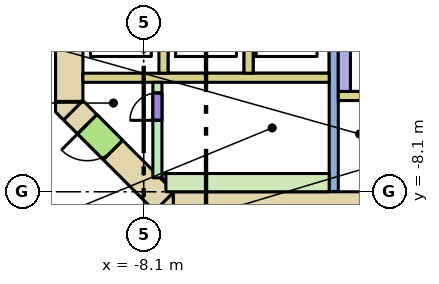
"""IFC4 building model, lengths in metres.
Left out: names, types, materials, properties, quantities, classifications, styles, units other than length and angle.
Written with IfcOpenShell. Run it as: python <this file> out.ifc"""

import sys

from ifc_helpers import new_model, si_unit, direction, frame, frame_2d, origin, place, context, subcontext, project, spatial, polyline, rectangle, outline, extrude, element, fill, save


model = new_model("IFC4")
c1 = context("Model", 3, precision=1e-05, world=origin(), true_north=direction((0.0, 1.0)))
c2 = subcontext(c1, "Body", "Model", "MODEL_VIEW")
j1 = project(units=[si_unit("LENGTHUNIT", "METRE"), si_unit("PLANEANGLEUNIT", "RADIAN")], contexts=[c1])
p1 = place(None, origin())
s1 = spatial("IfcSite", under=j1, at=p1, CompositionType="ELEMENT")
p2 = place(p1, origin())
s2 = spatial("IfcBuilding", under=s1, at=p2, CompositionType="ELEMENT")
p3 = place(p2, frame((0.0, 0.0, -3.6)))
s3 = spatial("IfcBuildingStorey", under=s2, at=p3, CompositionType="ELEMENT", Elevation=-3.6)
p4 = place(p3, frame((-7.13, -8.55, -0.32), z_axis=(0.0, 0.0, 1.0), x_axis=(1.0, 0.0, 0.0)))
e1 = element("IfcWall", 1, at=p4, inside=s3, PredefinedType="SHEAR", context=c2, shape_type="SweptSolid", body=[
    extrude(rectangle(XDim=14.26, YDim=0.9, at=frame_2d((7.13, 0.0))), origin(), (0.0, 0.0, 1.0), 3.6),
])
p5 = place(p4, frame((8.08, 0.0, 0.32)))
e2 = element("IfcOpeningElement", 2, at=p5, cuts=e1, PredefinedType="OPENING", context=c2, shape_type="SweptSolid", body=[
    extrude(rectangle(XDim=0.7, YDim=2.1, at=frame_2d((0.35, 1.05))), frame((0.0, 0.46, 0.0), z_axis=(0.0, -1.0, 0.0), x_axis=(1.0, 0.0, 0.0)), (0.0, 0.0, 1.0), 0.92),
])
p6 = place(p4, frame((6.205, 0.0, 0.32)))
e3 = element("IfcOpeningElement", 3, at=p6, cuts=e1, PredefinedType="OPENING", context=c2, shape_type="SweptSolid", body=[
    extrude(rectangle(XDim=0.9, YDim=2.1, at=frame_2d((0.45, 1.05))), frame((0.0, 0.46, 0.0), z_axis=(0.0, -1.0, 0.0), x_axis=(1.0, 0.0, 0.0)), (0.0, 0.0, 1.0), 0.92),
])
p7 = place(p4, frame((10.667, 0.0, 0.32)))
e4 = element("IfcOpeningElement", 4, at=p7, cuts=e1, PredefinedType="OPENING", context=c2, shape_type="SweptSolid", body=[
    extrude(rectangle(XDim=0.9, YDim=2.1, at=frame_2d((0.45, 1.05))), frame((0.0, 0.46, 0.0), z_axis=(0.0, -1.0, 0.0), x_axis=(1.0, 0.0, 0.0)), (0.0, 0.0, 1.0), 0.92),
])
p8 = place(p3, frame((-10.55, -5.13, -0.32), z_axis=(0.0, 0.0, 1.0), x_axis=(0.0, 1.0, 0.0)))
e5 = element("IfcWall", 5, at=p8, inside=s3, PredefinedType="SHEAR", context=c2, shape_type="SweptSolid", body=[
    extrude(rectangle(XDim=10.26, YDim=0.9, at=frame_2d((5.13, 0.0))), origin(), (0.0, 0.0, 1.0), 3.6),
])
p9 = place(p8, frame((4.13, 0.0, 0.32)))
e6 = element("IfcOpeningElement", 6, at=p9, cuts=e5, PredefinedType="OPENING", context=c2, shape_type="SweptSolid", body=[
    extrude(rectangle(XDim=2.0, YDim=2.1, at=frame_2d((1.0, 1.05))), frame((0.0, 0.46, 0.0), z_axis=(0.0, -1.0, 0.0), x_axis=(1.0, 0.0, 0.0)), (0.0, 0.0, 1.0), 0.92),
])
p10 = place(p3, frame((-7.418, -8.418, -0.32), z_axis=(0.0, 0.0, 1.0), x_axis=(-0.707106781187, 0.707106781187, 0.0)))
e7 = element("IfcWall", 7, at=p10, inside=s3, PredefinedType="SHEAR", context=c2, shape_type="SweptSolid", body=[
    extrude(rectangle(XDim=4.243, YDim=0.9, at=frame_2d((2.121, 0.0))), origin(), (0.0, 0.0, 1.0), 3.6),
])
p11 = place(p10, frame((2.393, 0.0, 0.32)))
e8 = element("IfcOpeningElement", 8, at=p11, cuts=e7, PredefinedType="OPENING", context=c2, shape_type="SweptSolid", body=[
    extrude(rectangle(XDim=1.2, YDim=2.1, at=frame_2d((0.6, 1.05))), frame((0.0, 0.46, 0.0), z_axis=(0.0, -1.0, 0.0), x_axis=(1.0, 0.0, 0.0)), (0.0, 0.0, 1.0), 0.92),
])
p12 = place(p3, frame((0.0, 0.0, -0.32)))
e9 = element("IfcWall", 9, at=p12, inside=s3, PredefinedType="SHEAR", context=c2, shape_type="SweptSolid", body=[
    extrude(outline(polyline([(-7.473, -9.0), (-7.736, -8.736), (-7.13, -8.13), (-7.13, -9.0), (-7.473, -9.0)])), origin(), (0.0, 0.0, 1.0), 3.6),
])
p13 = place(p3, frame((0.0, 0.0, -0.32)))
e10 = element("IfcWall", 10, at=p13, inside=s3, PredefinedType="SHEAR", context=c2, shape_type="SweptSolid", body=[
    extrude(outline(polyline([(-11.0, -5.473), (-11.0, -5.13), (-10.13, -5.13), (-10.736, -5.736), (-11.0, -5.473)])), origin(), (0.0, 0.0, 1.0), 3.6),
])
p14 = place(p3, frame((-10.1, -4.35, 0.0), z_axis=(0.0, 0.0, 1.0), x_axis=(1.0, 0.0, 0.0)))
e11 = element("IfcWall", 11, at=p14, inside=s3, PredefinedType="SOLIDWALL", context=c2, shape_type="SweptSolid", body=[
    extrude(rectangle(XDim=8.1, YDim=0.3, at=frame_2d((4.05, 0.0))), origin(), (0.0, 0.0, 1.0), 3.28),
])
for number, where, z_axis, x_axis in (
    (12, (-7.45, -4.2, 0.0), (0.0, 0.0, 1.0), (0.0, 1.0, 0.0)),
    (13, (-4.65, -4.2, 0.0), (0.0, 0.0, 1.0), (0.0, 1.0, 0.0)),
):
    element("IfcWall", number, at=place(p3, frame(where, z_axis=z_axis, x_axis=x_axis)), inside=s3, PredefinedType="SOLIDWALL", context=c2, shape_type="SweptSolid", body=[
        extrude(rectangle(XDim=2.4, YDim=0.3, at=frame_2d((1.2, 0.0))), origin(), (0.0, 0.0, 1.0), 3.28),
    ])
p15 = place(p3, frame((-1.85, -8.1, 0.0), z_axis=(0.0, 0.0, 1.0), x_axis=(0.0, 1.0, 0.0)))
e14 = element("IfcWall", 14, at=p15, inside=s3, PredefinedType="SHEAR", context=c2, shape_type="SweptSolid", body=[
    extrude(rectangle(XDim=6.6, YDim=0.3, at=frame_2d((3.3, 0.0))), origin(), (0.0, 0.0, 1.0), 3.28),
])
p16 = place(p3, frame((-1.5, -4.8, 0.0), z_axis=(0.0, 0.0, 1.0), x_axis=(0.0, 1.0, 0.0)))
e15 = element("IfcWall", 15, at=p16, inside=s3, PredefinedType="SOLIDWALL", context=c2, shape_type="SweptSolid", body=[
    extrude(rectangle(XDim=3.0, YDim=0.4, at=frame_2d((1.5, 0.0))), origin(), (0.0, 0.0, 1.0), 3.28),
])
p17 = place(p3, frame((-1.7, -4.95, 0.0), z_axis=(0.0, 0.0, 1.0), x_axis=(1.0, 0.0, 0.0)))
e16 = element("IfcWall", 16, at=p17, inside=s3, PredefinedType="SOLIDWALL", context=c2, shape_type="SweptSolid", body=[
    extrude(rectangle(XDim=3.4, YDim=0.3, at=frame_2d((1.7, 0.0))), origin(), (0.0, 0.0, 1.0), 3.28),
])
p18 = place(p3, frame((-7.65, -7.64, 0.0), z_axis=(0.0, 0.0, 1.0), x_axis=(0.0, 1.0, 0.0)))
e17 = element("IfcWall", 17, at=p18, inside=s3, PredefinedType="SHEAR", context=c2, shape_type="SweptSolid", body=[
    extrude(rectangle(XDim=3.14, YDim=0.3, at=frame_2d((1.57, 0.0))), origin(), (0.0, 0.0, 1.0), 3.28),
])
p19 = place(p18, frame((1.89, 0.0, 0.0)))
e18 = element("IfcOpeningElement", 18, at=p19, cuts=e17, PredefinedType="OPENING", context=c2, shape_type="SweptSolid", body=[
    extrude(rectangle(XDim=0.9, YDim=2.1, at=frame_2d((0.45, 1.05))), frame((0.0, 0.16, 0.0), z_axis=(0.0, -1.0, 0.0), x_axis=(1.0, 0.0, 0.0)), (0.0, 0.0, 1.0), 0.32),
])
p20 = place(p3, frame((-7.5, -7.6, 0.0), z_axis=(0.0, 0.0, 1.0), x_axis=(1.0, 0.0, 0.0)))
e19 = element("IfcWall", 19, at=p20, inside=s3, PredefinedType="SHEAR", context=c2, shape_type="SweptSolid", body=[
    extrude(rectangle(XDim=0.6, YDim=0.2, at=frame_2d((0.3, 0.0))), origin(), (0.0, 0.0, 1.0), 3.28),
])
p21 = place(p3, frame((-7.37, -7.8, 0.0), z_axis=(0.0, 0.0, 1.0), x_axis=(1.0, 0.0, 0.0)))
e20 = element("IfcWall", 20, at=p21, inside=s3, PredefinedType="SHEAR", context=c2, shape_type="SweptSolid", body=[
    extrude(rectangle(XDim=5.37, YDim=0.6, at=frame_2d((2.685, 0.0))), origin(), (0.0, 0.0, 1.0), 3.28),
])
p22 = place(p19, origin())
e21 = element("IfcDoor", 21, at=p22, inside=s3, OperationType="SINGLE_SWING_LEFT", PredefinedType="DOOR", context=c2, shape_type="SweptSolid", body=[
    extrude(rectangle(XDim=0.9, YDim=2.1, at=frame_2d((0.45, 1.05))), frame((0.0, 0.025, 0.0), z_axis=(0.0, -1.0, 0.0), x_axis=(1.0, 0.0, 0.0)), (0.0, 0.0, 1.0), 0.05),
])
fill(e18, e21)
p23 = place(p11, origin())
e22 = element("IfcDoor", 22, at=p23, inside=s3, OperationType="SINGLE_SWING_RIGHT", PredefinedType="DOOR", context=c2, shape_type="SweptSolid", body=[
    extrude(rectangle(XDim=1.2, YDim=2.1, at=frame_2d((0.6, 1.05))), frame((0.0, 0.025, 0.0), z_axis=(0.0, -1.0, 0.0), x_axis=(1.0, 0.0, 0.0)), (0.0, 0.0, 1.0), 0.05),
])
fill(e8, e22)
save(model, sys.argv[1])
